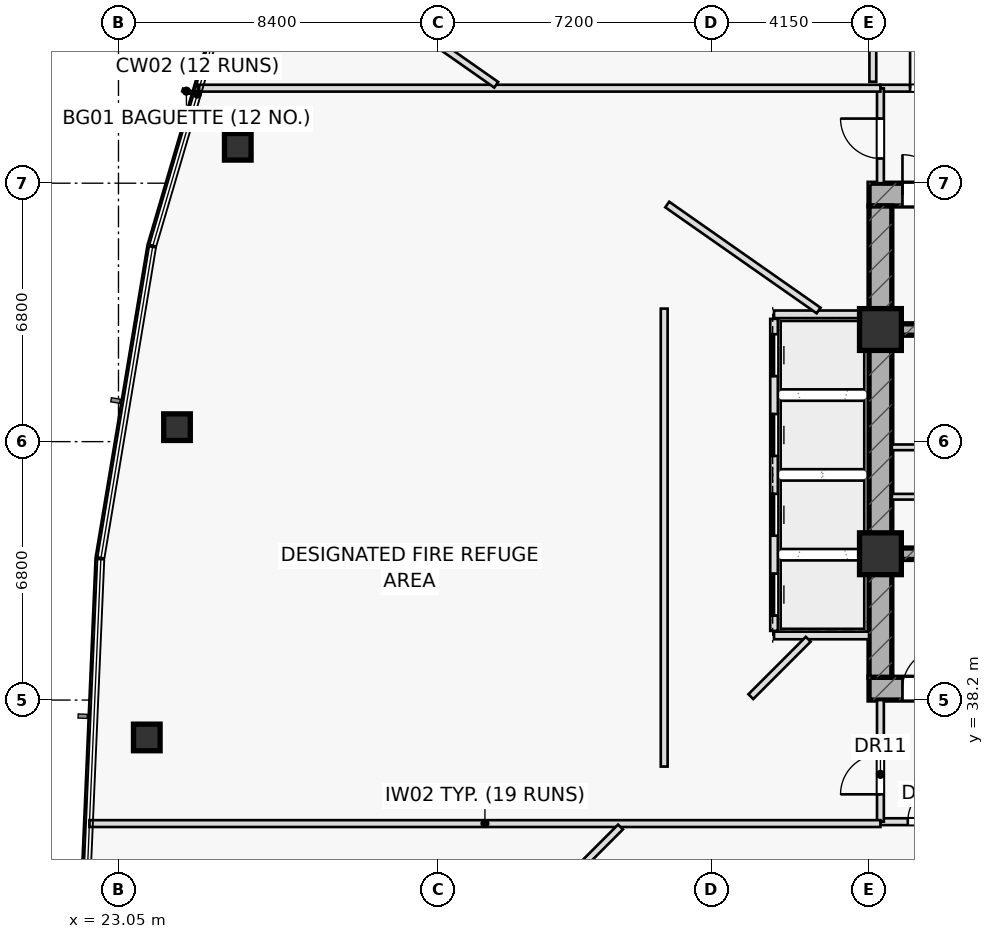
"""IFC4 building model, lengths in metres.
Left out: names, types, materials, properties, quantities, classifications, styles, units other than length and angle.
Written with IfcOpenShell. Run it as: python <this file> out.ifc"""

import sys

from ifc_helpers import new_model, si_unit, direction, frame, frame_2d, origin, origin_2d, place, context, subcontext, project, spatial, rectangle, hollow_rectangle, extrude, element, fill, save


model = new_model("IFC4")
c1 = context("Model", 3, precision=1e-05, world=origin(), true_north=direction((0.0, 1.0)))
c2 = subcontext(c1, "Body", "Model", "MODEL_VIEW")
j1 = project(units=[si_unit("LENGTHUNIT", "METRE"), si_unit("PLANEANGLEUNIT", "RADIAN")], contexts=[c1])
p1 = place(None, origin())
s1 = spatial("IfcSite", under=j1, at=p1, CompositionType="ELEMENT")
p2 = place(p1, origin())
s2 = spatial("IfcBuilding", under=s1, at=p2, CompositionType="ELEMENT")
p3 = place(p2, frame((0.0, 0.0, 97.8)))
s3 = spatial("IfcBuildingStorey", under=s2, at=p3, CompositionType="ELEMENT", Elevation=97.8)
p4 = place(p3, frame((42.8, 51.5, 0.0), z_axis=(0.0, 0.0, 1.0), x_axis=(1.0, 0.0, 0.0)))
e1 = element("IfcWall", 1, at=p4, inside=s3, PredefinedType="SHEAR", context=c2, shape_type="SweptSolid", body=[
    extrude(rectangle(XDim=14.4, YDim=0.6, at=frame_2d((7.2, 0.0))), origin(), (0.0, 0.0, 1.0), 4.55),
])
p5 = place(p4, frame((0.88, 0.0, 0.0)))
e2 = element("IfcOpeningElement", 2, at=p5, cuts=e1, PredefinedType="OPENING", context=c2, shape_type="SweptSolid", body=[
    extrude(rectangle(XDim=1.05, YDim=2.2, at=frame_2d((0.525, 1.1))), frame((0.0, 0.31, 0.0), z_axis=(0.0, -1.0, 0.0), x_axis=(1.0, 0.0, 0.0)), (0.0, 0.0, 1.0), 0.62),
])
p6 = place(p3, frame((42.8, 38.5, 0.0), z_axis=(0.0, 0.0, 1.0), x_axis=(1.0, 0.0, 0.0)))
e3 = element("IfcWall", 3, at=p6, inside=s3, PredefinedType="SHEAR", context=c2, shape_type="SweptSolid", body=[
    extrude(rectangle(XDim=14.4, YDim=0.6, at=frame_2d((7.2, 0.0))), origin(), (0.0, 0.0, 1.0), 4.55),
])
p7 = place(p6, frame((0.88, 0.0, 0.0)))
e4 = element("IfcOpeningElement", 4, at=p7, cuts=e3, PredefinedType="OPENING", context=c2, shape_type="SweptSolid", body=[
    extrude(rectangle(XDim=1.05, YDim=2.2, at=frame_2d((0.525, 1.1))), frame((0.0, 0.31, 0.0), z_axis=(0.0, -1.0, 0.0), x_axis=(1.0, 0.0, 0.0)), (0.0, 0.0, 1.0), 0.62),
])
p8 = place(p3, frame((43.1, 38.8, 0.0), z_axis=(0.0, 0.0, 1.0), x_axis=(0.0, 1.0, 0.0)))
e5 = element("IfcWall", 5, at=p8, inside=s3, PredefinedType="SHEAR", context=c2, shape_type="SweptSolid", body=[
    extrude(rectangle(XDim=12.4, YDim=0.6, at=frame_2d((6.2, 0.0))), origin(), (0.0, 0.0, 1.0), 4.55),
])
p9 = place(p3, frame((43.4, 47.95, 0.0), z_axis=(0.0, 0.0, 1.0), x_axis=(1.0, 0.0, 0.0)))
e6 = element("IfcWall", 6, at=p9, inside=s3, PredefinedType="SHEAR", context=c2, shape_type="SweptSolid", body=[
    extrude(rectangle(XDim=13.2, YDim=0.3, at=frame_2d((6.6, 0.0))), origin(), (0.0, 0.0, 1.0), 4.55),
])
p10 = place(p9, frame((8.345, 0.0, 0.0)))
e7 = element("IfcOpeningElement", 7, at=p10, cuts=e6, PredefinedType="OPENING", context=c2, shape_type="SweptSolid", body=[
    extrude(rectangle(XDim=1.15, YDim=2.2, at=frame_2d((0.575, 1.1))), frame((0.0, 0.16, 0.0), z_axis=(0.0, -1.0, 0.0), x_axis=(1.0, 0.0, 0.0)), (0.0, 0.0, 1.0), 0.32),
])
p11 = place(p9, frame((10.065, 0.0, 0.0)))
e8 = element("IfcOpeningElement", 8, at=p11, cuts=e6, PredefinedType="OPENING", context=c2, shape_type="SweptSolid", body=[
    extrude(rectangle(XDim=1.15, YDim=2.2, at=frame_2d((0.575, 1.1))), frame((0.0, 0.16, 0.0), z_axis=(0.0, -1.0, 0.0), x_axis=(1.0, 0.0, 0.0)), (0.0, 0.0, 1.0), 0.32),
])
p12 = place(p9, frame((11.645, 0.0, 0.0)))
e9 = element("IfcOpeningElement", 9, at=p12, cuts=e6, PredefinedType="OPENING", context=c2, shape_type="SweptSolid", body=[
    extrude(rectangle(XDim=1.15, YDim=2.2, at=frame_2d((0.575, 1.1))), frame((0.0, 0.16, 0.0), z_axis=(0.0, -1.0, 0.0), x_axis=(1.0, 0.0, 0.0)), (0.0, 0.0, 1.0), 0.32),
])
p13 = place(p3, frame((43.4, 42.05, 0.0), z_axis=(0.0, 0.0, 1.0), x_axis=(1.0, 0.0, 0.0)))
e10 = element("IfcWall", 10, at=p13, inside=s3, PredefinedType="SHEAR", context=c2, shape_type="SweptSolid", body=[
    extrude(rectangle(XDim=13.2, YDim=0.3, at=frame_2d((6.6, 0.0))), origin(), (0.0, 0.0, 1.0), 4.55),
])
for number, where, z_axis, x_axis in (
    (11, (43.1, 47.95, 0.0), (0.0, 0.0, 1.0), (1.0, 0.0, 0.0)),
    (12, (43.1, 42.05, 0.0), (0.0, 0.0, 1.0), (1.0, 0.0, 0.0)),
):
    element("IfcColumn", number, at=place(p3, frame(where, z_axis=z_axis, x_axis=x_axis)), inside=s3, PredefinedType="COLUMN", context=c2, shape_type="SweptSolid", body=[
        extrude(rectangle(XDim=1.1, YDim=1.1, at=origin_2d()), origin(), (0.0, 0.0, 1.0), 4.55),
    ])
for number, where, z_axis, x_axis in (
    (13, (26.189, 52.758, 0.0), (0.0, 0.0, 1.0), (1.0, 0.0, 0.0)),
    (14, (24.59, 45.381, 0.0), (0.0, 0.0, 1.0), (1.0, 0.0, 0.0)),
    (15, (23.795, 37.216, 0.0), (0.0, 0.0, 1.0), (1.0, 0.0, 0.0)),
):
    element("IfcColumn", number, at=place(p3, frame(where, z_axis=z_axis, x_axis=x_axis)), inside=s3, PredefinedType="COLUMN", context=c2, shape_type="SweptSolid", body=[
        extrude(hollow_rectangle(XDim=0.7, YDim=0.7, WallThickness=0.04, at=origin_2d()), origin(), (0.0, 0.0, 1.0), 5.0),
    ])
for number, where, z_axis, x_axis in (
    (16, (40.3, 39.9, 0.0), (0.0, 0.0, 1.0), (1.0, 0.0, 0.0)),
    (17, (40.3, 48.35, 0.0), (0.0, 0.0, 1.0), (1.0, 0.0, 0.0)),
):
    element("IfcWall", number, at=place(p3, frame(where, z_axis=z_axis, x_axis=x_axis)), inside=s3, PredefinedType="PARTITIONING", context=c2, shape_type="SweptSolid", body=[
        extrude(rectangle(XDim=2.5, YDim=0.2, at=frame_2d((1.25, 0.0))), origin(), (0.0, 0.0, 1.0), 4.55),
    ])
for number, where, z_axis, x_axis in (
    (18, (43.4, 43.55, 0.0), (0.0, 0.0, 1.0), (1.0, 0.0, 0.0)),
    (19, (43.4, 44.85, 0.0), (0.0, 0.0, 1.0), (1.0, 0.0, 0.0)),
):
    element("IfcWall", number, at=place(p3, frame(where, z_axis=z_axis, x_axis=x_axis)), inside=s3, PredefinedType="PARTITIONING", context=c2, shape_type="SweptSolid", body=[
        extrude(rectangle(XDim=2.35, YDim=0.15, at=frame_2d((1.175, 0.0))), origin(), (0.0, 0.0, 1.0), 4.55),
    ])
p14 = place(p3, frame((43.1, 54.3, 0.0), z_axis=(0.0, 0.0, 1.0), x_axis=(1.0, 0.0, 0.0)))
e20 = element("IfcWall", 20, at=p14, inside=s3, PredefinedType="PARTITIONING", context=c2, shape_type="SweptSolid", body=[
    extrude(rectangle(XDim=2.62, YDim=0.18, at=frame_2d((1.31, 0.0))), origin(), (0.0, 0.0, 1.0), 4.55),
])
p15 = place(p14, frame((0.78, 0.0, 0.0)))
e21 = element("IfcOpeningElement", 21, at=p15, cuts=e20, PredefinedType="OPENING", context=c2, shape_type="SweptSolid", body=[
    extrude(rectangle(XDim=1.05, YDim=2.2, at=frame_2d((0.525, 1.1))), frame((0.0, 0.1, 0.0), z_axis=(0.0, -1.0, 0.0), x_axis=(1.0, 0.0, 0.0)), (0.0, 0.0, 1.0), 0.2),
])
p16 = place(p3, frame((43.1, 35.0, 0.0), z_axis=(0.0, 0.0, 1.0), x_axis=(1.0, 0.0, 0.0)))
e22 = element("IfcWall", 22, at=p16, inside=s3, PredefinedType="PARTITIONING", context=c2, shape_type="SweptSolid", body=[
    extrude(rectangle(XDim=2.58, YDim=0.18, at=frame_2d((1.29, 0.0))), origin(), (0.0, 0.0, 1.0), 3.925),
])
p17 = place(p16, frame((0.72, 0.0, 0.0)))
e23 = element("IfcOpeningElement", 23, at=p17, cuts=e22, PredefinedType="OPENING", context=c2, shape_type="SweptSolid", body=[
    extrude(rectangle(XDim=1.05, YDim=2.2, at=frame_2d((0.525, 1.1))), frame((0.0, 0.1, 0.0), z_axis=(0.0, -1.0, 0.0), x_axis=(1.0, 0.0, 0.0)), (0.0, 0.0, 1.0), 0.2),
])
p18 = place(p3, frame((43.1, 51.8, 0.0), z_axis=(0.0, 0.0, 1.0), x_axis=(0.0, 1.0, 0.0)))
e24 = element("IfcWall", 24, at=p18, inside=s3, PredefinedType="PARTITIONING", context=c2, shape_type="SweptSolid", body=[
    extrude(rectangle(XDim=2.5, YDim=0.18, at=frame_2d((1.25, 0.0))), origin(), (0.0, 0.0, 1.0), 3.925),
])
p19 = place(p18, frame((0.65, 0.0, 0.0)))
e25 = element("IfcOpeningElement", 25, at=p19, cuts=e24, PredefinedType="OPENING", context=c2, shape_type="SweptSolid", body=[
    extrude(rectangle(XDim=1.05, YDim=2.2, at=frame_2d((0.525, 1.1))), frame((0.0, 0.1, 0.0), z_axis=(0.0, -1.0, 0.0), x_axis=(1.0, 0.0, 0.0)), (0.0, 0.0, 1.0), 0.2),
])
p20 = place(p3, frame((43.1, 35.0, 0.0), z_axis=(0.0, 0.0, 1.0), x_axis=(0.0, 1.0, 0.0)))
e26 = element("IfcWall", 26, at=p20, inside=s3, PredefinedType="PARTITIONING", context=c2, shape_type="SweptSolid", body=[
    extrude(rectangle(XDim=3.2, YDim=0.18, at=frame_2d((1.6, 0.0))), origin(), (0.0, 0.0, 1.0), 3.925),
])
p21 = place(p20, frame((0.72, 0.0, 0.0)))
e27 = element("IfcOpeningElement", 27, at=p21, cuts=e26, PredefinedType="OPENING", context=c2, shape_type="SweptSolid", body=[
    extrude(rectangle(XDim=1.05, YDim=2.2, at=frame_2d((0.525, 1.1))), frame((0.0, 0.1, 0.0), z_axis=(0.0, -1.0, 0.0), x_axis=(1.0, 0.0, 0.0)), (0.0, 0.0, 1.0), 0.2),
])
p22 = place(p3, frame((25.173, 54.3, 0.0), z_axis=(0.0, 0.0, 1.0), x_axis=(1.0, 0.0, 0.0)))
e28 = element("IfcWall", 28, at=p22, inside=s3, PredefinedType="PARTITIONING", context=c2, shape_type="SweptSolid", body=[
    extrude(rectangle(XDim=17.927, YDim=0.18, at=frame_2d((8.964, 0.0))), origin(), (0.0, 0.0, 1.0), 3.925),
])
p23 = place(p3, frame((22.285, 34.95, 0.0), z_axis=(0.0, 0.0, 1.0), x_axis=(1.0, 0.0, 0.0)))
e29 = element("IfcWall", 29, at=p23, inside=s3, PredefinedType="PARTITIONING", context=c2, shape_type="SweptSolid", body=[
    extrude(rectangle(XDim=20.815, YDim=0.18, at=frame_2d((10.407, 0.0))), origin(), (0.0, 0.0, 1.0), 3.925),
])
p24 = place(p3, frame((37.41, 36.45, 0.0), z_axis=(0.0, 0.0, 1.0), x_axis=(0.0, 1.0, 0.0)))
e30 = element("IfcWall", 30, at=p24, inside=s3, PredefinedType="PARTITIONING", context=c2, shape_type="SweptSolid", body=[
    extrude(rectangle(XDim=12.05, YDim=0.18, at=frame_2d((6.025, 0.0))), origin(), (0.0, 0.0, 1.0), 3.925),
])
p25 = place(p3, frame((41.473, 48.45, 0.0), z_axis=(0.0, 0.0, 1.0), x_axis=(-0.819156427122, 0.573570176966, 0.0)))
e31 = element("IfcWall", 31, at=p25, inside=s3, PredefinedType="PARTITIONING", context=c2, shape_type="SweptSolid", body=[
    extrude(rectangle(XDim=4.862, YDim=0.18, at=frame_2d((2.431, 0.0))), origin(), (0.0, 0.0, 1.0), 3.925),
])
p26 = place(p3, frame((32.99, 54.39, 0.0), z_axis=(0.0, 0.0, 1.0), x_axis=(-0.819142061869, 0.57359069246, 0.0)))
e32 = element("IfcWall", 32, at=p26, inside=s3, PredefinedType="PARTITIONING", context=c2, shape_type="SweptSolid", body=[
    extrude(rectangle(XDim=7.787, YDim=0.18, at=frame_2d((3.894, 0.0))), origin(), (0.0, 0.0, 1.0), 3.975),
])
p27 = place(p3, frame((41.2, 39.8, 0.0), z_axis=(0.0, 0.0, 1.0), x_axis=(-0.707106781187, -0.707106781187, 0.0)))
e33 = element("IfcWall", 33, at=p27, inside=s3, PredefinedType="PARTITIONING", context=c2, shape_type="SweptSolid", body=[
    extrude(rectangle(XDim=2.135, YDim=0.18, at=frame_2d((1.068, 0.0))), origin(), (0.0, 0.0, 1.0), 3.925),
])
p28 = place(p3, frame((36.26, 34.86, 0.0), z_axis=(0.0, 0.0, 1.0), x_axis=(-0.707106781187, -0.707106781187, 0.0)))
e34 = element("IfcWall", 34, at=p28, inside=s3, PredefinedType="PARTITIONING", context=c2, shape_type="SweptSolid", body=[
    extrude(rectangle(XDim=17.605, YDim=0.18, at=frame_2d((8.802, 0.0))), origin(), (0.0, 0.0, 1.0), 3.925),
])
p29 = place(p3, frame((42.9, 54.47, 0.0), z_axis=(0.0, 0.0, 1.0), x_axis=(0.0, 1.0, 0.0)))
e35 = element("IfcWall", 35, at=p29, inside=s3, PredefinedType="PARTITIONING", context=c2, shape_type="SweptSolid", body=[
    extrude(rectangle(XDim=2.69, YDim=0.18, at=frame_2d((1.345, 0.0))), origin(), (0.0, 0.0, 1.0), 3.925),
])
p30 = place(p3, frame((40.3, 40.02, 0.0), z_axis=(0.0, 0.0, 1.0), x_axis=(0.0, 1.0, 0.0)))
e36 = element("IfcWall", 36, at=p30, inside=s3, PredefinedType="PARTITIONING", context=c2, shape_type="SweptSolid", body=[
    extrude(rectangle(XDim=8.21, YDim=0.2, at=frame_2d((4.105, 0.0))), origin(), (0.0, 0.0, 1.0), 4.55),
])
p31 = place(p30, frame((0.405, 0.0, 0.0)))
e37 = element("IfcOpeningElement", 37, at=p31, cuts=e36, PredefinedType="OPENING", context=c2, shape_type="SweptSolid", body=[
    extrude(rectangle(XDim=1.1, YDim=2.15, at=frame_2d((0.55, 1.075))), frame((0.0, 0.11, 0.0), z_axis=(0.0, -1.0, 0.0), x_axis=(1.0, 0.0, 0.0)), (0.0, 0.0, 1.0), 0.22),
])
p32 = place(p30, frame((2.505, 0.0, 0.0)))
e38 = element("IfcOpeningElement", 38, at=p32, cuts=e36, PredefinedType="OPENING", context=c2, shape_type="SweptSolid", body=[
    extrude(rectangle(XDim=1.1, YDim=2.15, at=frame_2d((0.55, 1.075))), frame((0.0, 0.11, 0.0), z_axis=(0.0, -1.0, 0.0), x_axis=(1.0, 0.0, 0.0)), (0.0, 0.0, 1.0), 0.22),
])
p33 = place(p30, frame((4.605, 0.0, 0.0)))
e39 = element("IfcOpeningElement", 39, at=p33, cuts=e36, PredefinedType="OPENING", context=c2, shape_type="SweptSolid", body=[
    extrude(rectangle(XDim=1.1, YDim=2.15, at=frame_2d((0.55, 1.075))), frame((0.0, 0.11, 0.0), z_axis=(0.0, -1.0, 0.0), x_axis=(1.0, 0.0, 0.0)), (0.0, 0.0, 1.0), 0.22),
])
p34 = place(p30, frame((6.705, 0.0, 0.0)))
e40 = element("IfcOpeningElement", 40, at=p34, cuts=e36, PredefinedType="OPENING", context=c2, shape_type="SweptSolid", body=[
    extrude(rectangle(XDim=1.1, YDim=2.15, at=frame_2d((0.55, 1.075))), frame((0.0, 0.11, 0.0), z_axis=(0.0, -1.0, 0.0), x_axis=(1.0, 0.0, 0.0)), (0.0, 0.0, 1.0), 0.22),
])
p35 = place(p5, origin())
e41 = element("IfcDoor", 41, at=p35, inside=s3, OperationType="SINGLE_SWING_LEFT", PredefinedType="DOOR", context=c2, shape_type="SweptSolid", body=[
    extrude(rectangle(XDim=1.05, YDim=2.2, at=frame_2d((0.525, 1.1))), frame((0.0, 0.025, 0.0), z_axis=(0.0, -1.0, 0.0), x_axis=(1.0, 0.0, 0.0)), (0.0, 0.0, 1.0), 0.05),
])
fill(e2, e41)
p36 = place(p7, origin())
e42 = element("IfcDoor", 42, at=p36, inside=s3, OperationType="SINGLE_SWING_RIGHT", PredefinedType="DOOR", context=c2, shape_type="SweptSolid", body=[
    extrude(rectangle(XDim=1.05, YDim=2.2, at=frame_2d((0.525, 1.1))), frame((0.0, 0.025, 0.0), z_axis=(0.0, -1.0, 0.0), x_axis=(1.0, 0.0, 0.0)), (0.0, 0.0, 1.0), 0.05),
])
fill(e4, e42)
p37 = place(p15, origin())
e43 = element("IfcDoor", 43, at=p37, inside=s3, OperationType="SINGLE_SWING_LEFT", PredefinedType="DOOR", context=c2, shape_type="SweptSolid", body=[
    extrude(rectangle(XDim=1.05, YDim=2.2, at=frame_2d((0.525, 1.1))), frame((0.0, 0.025, 0.0), z_axis=(0.0, -1.0, 0.0), x_axis=(1.0, 0.0, 0.0)), (0.0, 0.0, 1.0), 0.05),
])
fill(e21, e43)
p38 = place(p17, origin())
e44 = element("IfcDoor", 44, at=p38, inside=s3, OperationType="SINGLE_SWING_RIGHT", PredefinedType="DOOR", context=c2, shape_type="SweptSolid", body=[
    extrude(rectangle(XDim=1.05, YDim=2.2, at=frame_2d((0.525, 1.1))), frame((0.0, 0.025, 0.0), z_axis=(0.0, -1.0, 0.0), x_axis=(1.0, 0.0, 0.0)), (0.0, 0.0, 1.0), 0.05),
])
fill(e23, e44)
p39 = place(p19, origin())
e45 = element("IfcDoor", 45, at=p39, inside=s3, OperationType="SINGLE_SWING_RIGHT", PredefinedType="DOOR", context=c2, shape_type="SweptSolid", body=[
    extrude(rectangle(XDim=1.05, YDim=2.2, at=frame_2d((0.525, 1.1))), frame((0.0, 0.025, 0.0), z_axis=(0.0, -1.0, 0.0), x_axis=(1.0, 0.0, 0.0)), (0.0, 0.0, 1.0), 0.05),
])
fill(e25, e45)
p40 = place(p21, origin())
e46 = element("IfcDoor", 46, at=p40, inside=s3, OperationType="SINGLE_SWING_LEFT", PredefinedType="DOOR", context=c2, shape_type="SweptSolid", body=[
    extrude(rectangle(XDim=1.05, YDim=2.2, at=frame_2d((0.525, 1.1))), frame((0.0, 0.025, 0.0), z_axis=(0.0, -1.0, 0.0), x_axis=(1.0, 0.0, 0.0)), (0.0, 0.0, 1.0), 0.05),
])
fill(e27, e46)
p41 = place(p31, origin())
e47 = element("IfcDoor", 47, at=p41, inside=s3, OperationType="SLIDING_TO_LEFT", PredefinedType="DOOR", context=c2, shape_type="SweptSolid", body=[
    extrude(rectangle(XDim=1.1, YDim=2.15, at=frame_2d((0.55, 1.075))), frame((0.0, 0.025, 0.0), z_axis=(0.0, -1.0, 0.0), x_axis=(1.0, 0.0, 0.0)), (0.0, 0.0, 1.0), 0.05),
])
fill(e37, e47)
p42 = place(p32, origin())
e48 = element("IfcDoor", 48, at=p42, inside=s3, OperationType="SLIDING_TO_RIGHT", PredefinedType="DOOR", context=c2, shape_type="SweptSolid", body=[
    extrude(rectangle(XDim=1.1, YDim=2.15, at=frame_2d((0.55, 1.075))), frame((0.0, 0.025, 0.0), z_axis=(0.0, -1.0, 0.0), x_axis=(1.0, 0.0, 0.0)), (0.0, 0.0, 1.0), 0.05),
])
fill(e38, e48)
p43 = place(p33, origin())
e49 = element("IfcDoor", 49, at=p43, inside=s3, OperationType="SLIDING_TO_LEFT", PredefinedType="DOOR", context=c2, shape_type="SweptSolid", body=[
    extrude(rectangle(XDim=1.1, YDim=2.15, at=frame_2d((0.55, 1.075))), frame((0.0, 0.025, 0.0), z_axis=(0.0, -1.0, 0.0), x_axis=(1.0, 0.0, 0.0)), (0.0, 0.0, 1.0), 0.05),
])
fill(e39, e49)
p44 = place(p34, origin())
e50 = element("IfcDoor", 50, at=p44, inside=s3, OperationType="SLIDING_TO_RIGHT", PredefinedType="DOOR", context=c2, shape_type="SweptSolid", body=[
    extrude(rectangle(XDim=1.1, YDim=2.15, at=frame_2d((0.55, 1.075))), frame((0.0, 0.025, 0.0), z_axis=(0.0, -1.0, 0.0), x_axis=(1.0, 0.0, 0.0)), (0.0, 0.0, 1.0), 0.05),
])
fill(e40, e50)
save(model, sys.argv[1])
